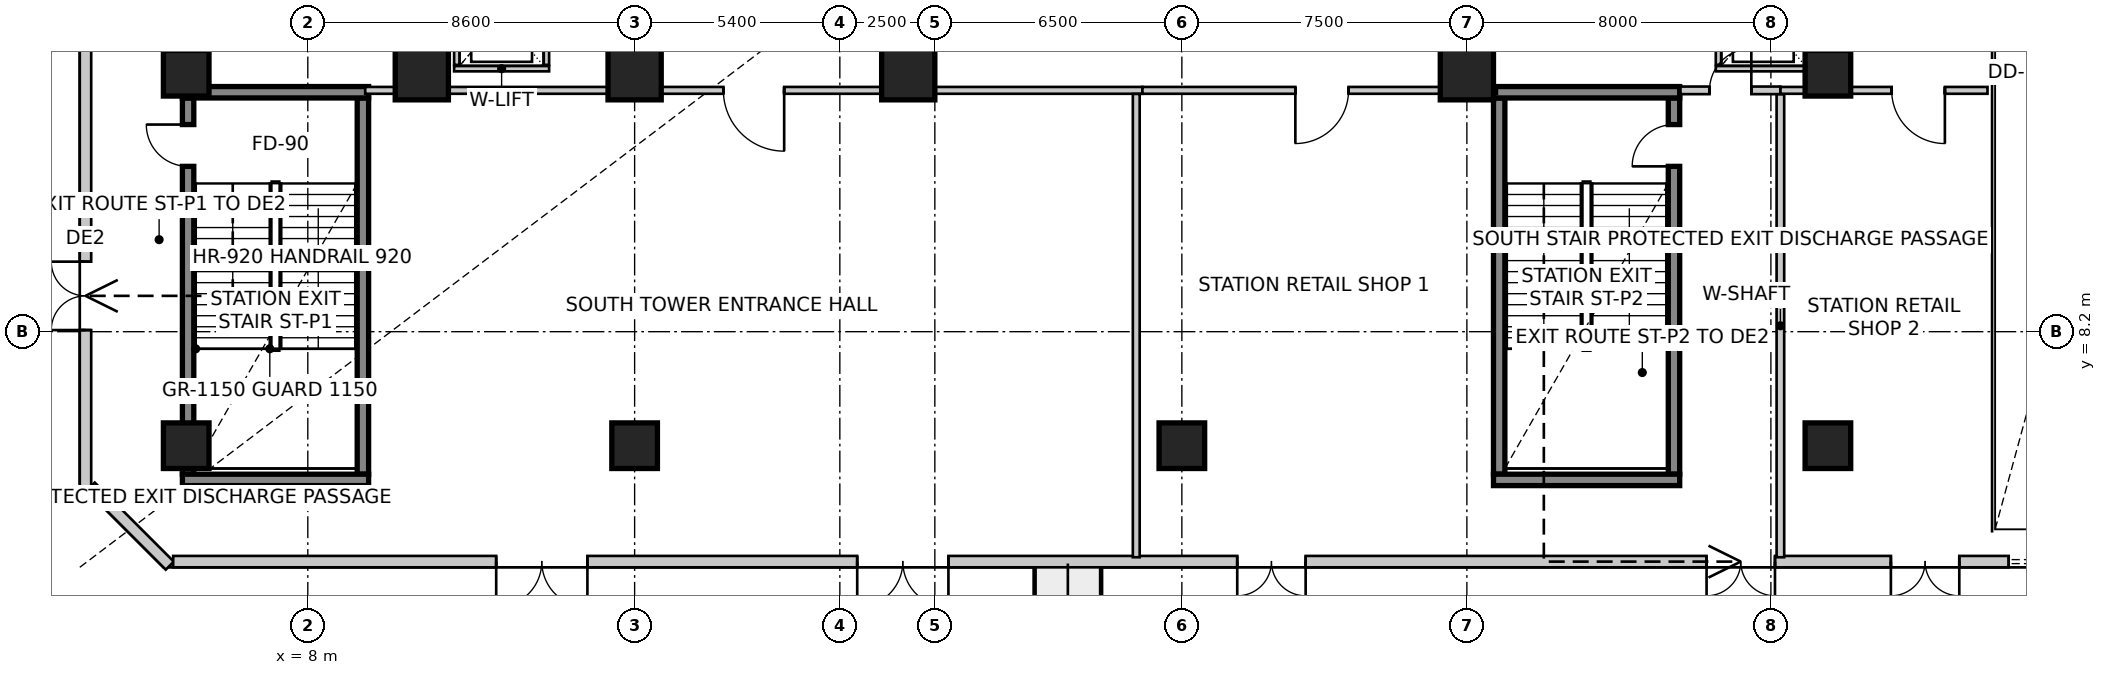
"""IFC4 building model, lengths in metres.
Left out: names, types, materials, properties, quantities, classifications, styles, units other than length and angle.
Written with IfcOpenShell. Run it as: python <this file> out.ifc"""

import sys

from ifc_helpers import new_model, si_unit, direction, frame, frame_2d, origin, origin_2d, place, context, subcontext, project, spatial, rectangle, extrude, source, transform, mapped, element, fill, save


model = new_model("IFC4")
c1 = context("Model", 3, precision=1e-05, world=origin(), true_north=direction((0.0, 1.0)))
c2 = subcontext(c1, "Body", "Model", "MODEL_VIEW")
j1 = project(units=[si_unit("LENGTHUNIT", "METRE"), si_unit("PLANEANGLEUNIT", "RADIAN")], contexts=[c1])
p1 = place(None, origin())
s1 = spatial("IfcSite", under=j1, at=p1, CompositionType="ELEMENT")
p2 = place(p1, origin())
s2 = spatial("IfcBuilding", under=s1, at=p2, CompositionType="ELEMENT")
p3 = place(p2, origin())
s3 = spatial("IfcBuildingStorey", under=s2, at=p3, CompositionType="ELEMENT", Elevation=0.0)
p4 = place(p3, frame((4.85, 4.45, 0.0), z_axis=(0.0, 0.0, 1.0), x_axis=(0.0, 1.0, 0.0)))
e1 = element("IfcWall", 1, at=p4, inside=s3, PredefinedType="SHEAR", context=c2, shape_type="SweptSolid", body=[
    extrude(rectangle(XDim=9.9, YDim=0.3, at=frame_2d((4.95, 0.0))), origin(), (0.0, 0.0, 1.0), 6.0),
])
m1 = source(origin(), c2, "Body", "SweptSolid", [
    extrude(rectangle(XDim=1.1, YDim=2.15, at=frame_2d((0.55, 1.075))), frame((0.0, 0.16, 0.0), z_axis=(0.0, -1.0, 0.0), x_axis=(1.0, 0.0, 0.0)), (0.0, 0.0, 1.0), 0.32),
])
p5 = place(p4, frame((8.1, 0.0, 0.0)))
e2 = element("IfcOpeningElement", 2, at=p5, cuts=e1, PredefinedType="OPENING", context=c2, shape_type="MappedRepresentation", body=[
    mapped(m1, transform((0.0, 0.0, 0.0), scale=1.0)),
])
p6 = place(p3, frame((9.45, 4.45, 0.0), z_axis=(0.0, 0.0, 1.0), x_axis=(0.0, 1.0, 0.0)))
e3 = element("IfcWall", 3, at=p6, inside=s3, PredefinedType="SHEAR", context=c2, shape_type="SweptSolid", body=[
    extrude(rectangle(XDim=9.9, YDim=0.3, at=frame_2d((4.95, 0.0))), origin(), (0.0, 0.0, 1.0), 6.0),
])
for number, where, z_axis, x_axis in (
    (4, (4.7, 4.3, 0.0), (0.0, 0.0, 1.0), (1.0, 0.0, 0.0)),
    (5, (4.7, 14.5, 0.0), (0.0, 0.0, 1.0), (1.0, 0.0, 0.0)),
):
    element("IfcWall", number, at=place(p3, frame(where, z_axis=z_axis, x_axis=x_axis)), inside=s3, PredefinedType="SHEAR", context=c2, shape_type="SweptSolid", body=[
        extrude(rectangle(XDim=4.9, YDim=0.3, at=frame_2d((2.45, 0.0))), origin(), (0.0, 0.0, 1.0), 6.0),
    ])
p7 = place(p3, frame((39.35, 4.45, 0.0), z_axis=(0.0, 0.0, 1.0), x_axis=(0.0, 1.0, 0.0)))
e6 = element("IfcWall", 6, at=p7, inside=s3, PredefinedType="SHEAR", context=c2, shape_type="SweptSolid", body=[
    extrude(rectangle(XDim=9.9, YDim=0.3, at=frame_2d((4.95, 0.0))), origin(), (0.0, 0.0, 1.0), 6.0),
])
p8 = place(p3, frame((43.95, 4.45, 0.0), z_axis=(0.0, 0.0, 1.0), x_axis=(0.0, 1.0, 0.0)))
e7 = element("IfcWall", 7, at=p8, inside=s3, PredefinedType="SHEAR", context=c2, shape_type="SweptSolid", body=[
    extrude(rectangle(XDim=9.9, YDim=0.3, at=frame_2d((4.95, 0.0))), origin(), (0.0, 0.0, 1.0), 6.0),
])
p9 = place(p8, frame((8.1, 0.0, 0.0)))
e8 = element("IfcOpeningElement", 8, at=p9, cuts=e7, PredefinedType="OPENING", context=c2, shape_type="MappedRepresentation", body=[
    mapped(m1, transform((0.0, 0.0, 0.0), scale=1.0)),
])
for number, where, z_axis, x_axis in (
    (9, (39.2, 4.3, 0.0), (0.0, 0.0, 1.0), (1.0, 0.0, 0.0)),
    (10, (39.2, 14.5, 0.0), (0.0, 0.0, 1.0), (1.0, 0.0, 0.0)),
):
    element("IfcWall", number, at=place(p3, frame(where, z_axis=z_axis, x_axis=x_axis)), inside=s3, PredefinedType="SHEAR", context=c2, shape_type="SweptSolid", body=[
        extrude(rectangle(XDim=4.9, YDim=0.3, at=frame_2d((2.45, 0.0))), origin(), (0.0, 0.0, 1.0), 6.0),
    ])
m2 = source(origin(), c2, "Body", "SweptSolid", [
    extrude(rectangle(XDim=1.2, YDim=1.2, at=origin_2d()), origin(), (0.0, 0.0, 1.0), 6.0),
])
for number, where, z_axis, x_axis in (
    (11, (4.8, 5.2, 0.0), (0.0, 0.0, 1.0), (1.0, 0.0, 0.0)),
    (12, (16.6, 5.2, 0.0), (0.0, 0.0, 1.0), (1.0, 0.0, 0.0)),
    (13, (31.0, 5.2, 0.0), (0.0, 0.0, 1.0), (1.0, 0.0, 0.0)),
    (14, (48.0, 5.2, 0.0), (0.0, 0.0, 1.0), (1.0, 0.0, 0.0)),
    (15, (4.8, 15.0, 0.0), (0.0, 0.0, 1.0), (1.0, 0.0, 0.0)),
):
    element("IfcColumn", number, at=place(p3, frame(where, z_axis=z_axis, x_axis=x_axis)), inside=s3, PredefinedType="COLUMN", context=c2, shape_type="MappedRepresentation", body=[
        mapped(m2, transform((0.0, 0.0, 0.0), scale=1.0)),
    ])
m3 = source(origin(), c2, "Body", "SweptSolid", [
    extrude(rectangle(XDim=1.4, YDim=1.4, at=origin_2d()), origin(), (0.0, 0.0, 1.0), 6.0),
])
for number, where, z_axis, x_axis in (
    (16, (11.0, 15.0, 0.0), (0.0, 0.0, 1.0), (1.0, 0.0, 0.0)),
    (17, (16.6, 15.0, 0.0), (0.0, 0.0, 1.0), (1.0, 0.0, 0.0)),
    (18, (23.8, 15.0, 0.0), (0.0, 0.0, 1.0), (1.0, 0.0, 0.0)),
    (19, (38.5, 15.0, 0.0), (0.0, 0.0, 1.0), (1.0, 0.0, 0.0)),
):
    element("IfcColumn", number, at=place(p3, frame(where, z_axis=z_axis, x_axis=x_axis)), inside=s3, PredefinedType="COLUMN", context=c2, shape_type="MappedRepresentation", body=[
        mapped(m3, transform((0.0, 0.0, 0.0), scale=1.0)),
    ])
p10 = place(p3, frame((48.0, 15.0, 0.0), z_axis=(0.0, 0.0, 1.0), x_axis=(1.0, 0.0, 0.0)))
e20 = element("IfcColumn", 20, at=p10, inside=s3, PredefinedType="COLUMN", context=c2, shape_type="MappedRepresentation", body=[
    mapped(m2, transform((0.0, 0.0, 0.0), scale=1.0)),
])
p11 = place(p3, frame((2.15, 4.112, 0.0), z_axis=(0.0, 0.0, 1.0), x_axis=(0.0, 1.0, 0.0)))
e21 = element("IfcWall", 21, at=p11, inside=s3, PredefinedType="SOLIDWALL", context=c2, shape_type="SweptSolid", body=[
    extrude(rectangle(XDim=45.431, YDim=0.3, at=frame_2d((22.715, 0.0))), origin(), (0.0, 0.0, 1.0), 5.7),
])
m4 = source(origin(), c2, "Body", "SweptSolid", [
    extrude(rectangle(XDim=2.4, YDim=2.8, at=frame_2d((1.2, 1.4))), frame((0.0, 0.16, 0.0), z_axis=(0.0, -1.0, 0.0), x_axis=(1.0, 0.0, 0.0)), (0.0, 0.0, 1.0), 0.32),
])
p12 = place(p11, frame((19.231, 0.0, 0.0)))
e22 = element("IfcOpeningElement", 22, at=p12, cuts=e21, PredefinedType="OPENING", context=c2, shape_type="MappedRepresentation", body=[
    mapped(m4, transform((0.0, 0.0, 0.0), scale=1.0)),
])
p13 = place(p11, frame((12.831, 0.0, 0.0)))
e23 = element("IfcOpeningElement", 23, at=p13, cuts=e21, PredefinedType="OPENING", context=c2, shape_type="MappedRepresentation", body=[
    mapped(m4, transform((0.0, 0.0, 0.0), scale=1.0)),
])
m5 = source(origin(), c2, "Body", "SweptSolid", [
    extrude(rectangle(XDim=1.8, YDim=2.4, at=frame_2d((0.9, 1.2))), frame((0.0, 0.16, 0.0), z_axis=(0.0, -1.0, 0.0), x_axis=(1.0, 0.0, 0.0)), (0.0, 0.0, 1.0), 0.32),
])
p14 = place(p11, frame((4.131, 0.0, 0.0)))
e24 = element("IfcOpeningElement", 24, at=p14, cuts=e21, PredefinedType="OPENING", context=c2, shape_type="MappedRepresentation", body=[
    mapped(m5, transform((0.0, 0.0, 0.0), scale=1.0)),
])
p15 = place(p3, frame((4.368, 2.044, 0.0), z_axis=(0.0, 0.0, 1.0), x_axis=(-0.707106781187, 0.707106781187, 0.0)))
e25 = element("IfcWall", 25, at=p15, inside=s3, PredefinedType="SOLIDWALL", context=c2, shape_type="SweptSolid", body=[
    extrude(rectangle(XDim=2.942, YDim=0.3, at=frame_2d((1.471, 0.0))), origin(), (0.0, 0.0, 1.0), 5.7),
])
p16 = place(p3, frame((65.543, 2.15, 0.0), z_axis=(0.0, 0.0, 1.0), x_axis=(-1.0, 0.0, 0.0)))
e26 = element("IfcWall", 26, at=p16, inside=s3, PredefinedType="SOLIDWALL", context=c2, shape_type="SweptSolid", body=[
    extrude(rectangle(XDim=61.085, YDim=0.3, at=frame_2d((30.543, 0.0))), origin(), (0.0, 0.0, 1.0), 5.7),
])
p17 = place(p16, frame((50.185, 0.0, 0.0)))
e27 = element("IfcOpeningElement", 27, at=p17, cuts=e26, PredefinedType="OPENING", context=c2, shape_type="MappedRepresentation", body=[
    mapped(m4, transform((0.0, 0.0, 0.0), scale=1.0)),
])
p18 = place(p16, frame((40.685, 0.0, 0.0)))
e28 = element("IfcOpeningElement", 28, at=p18, cuts=e26, PredefinedType="OPENING", context=c2, shape_type="MappedRepresentation", body=[
    mapped(m4, transform((0.0, 0.0, 0.0), scale=1.0)),
])
p19 = place(p16, frame((31.285, 0.0, 0.0)))
e29 = element("IfcOpeningElement", 29, at=p19, cuts=e26, PredefinedType="OPENING", context=c2, shape_type="MappedRepresentation", body=[
    mapped(m5, transform((0.0, 0.0, 0.0), scale=1.0)),
])
p20 = place(p16, frame((18.935, 0.0, 0.0)))
e30 = element("IfcOpeningElement", 30, at=p20, cuts=e26, PredefinedType="OPENING", context=c2, shape_type="MappedRepresentation", body=[
    mapped(m5, transform((0.0, 0.0, 0.0), scale=1.0)),
])
p21 = place(p16, frame((14.085, 0.0, 0.0)))
e31 = element("IfcOpeningElement", 31, at=p21, cuts=e26, PredefinedType="OPENING", context=c2, shape_type="MappedRepresentation", body=[
    mapped(m5, transform((0.0, 0.0, 0.0), scale=1.0)),
])
m6 = source(origin(), c2, "Body", "SweptSolid", [
    extrude(rectangle(XDim=5.8, YDim=3.8, at=frame_2d((2.9, 1.9))), frame((0.0, 0.16, 0.0), z_axis=(0.0, -1.0, 0.0), x_axis=(1.0, 0.0, 0.0)), (0.0, 0.0, 1.0), 0.32),
])
p22 = place(p16, frame((6.985, 0.0, 0.0)))
e32 = element("IfcOpeningElement", 32, at=p22, cuts=e26, PredefinedType="OPENING", context=c2, shape_type="MappedRepresentation", body=[
    mapped(m6, transform((0.0, 0.0, 0.0), scale=1.0)),
])
p23 = place(p3, frame((11.85, 15.12, 0.0), z_axis=(0.0, 0.0, 1.0), x_axis=(1.0, 0.0, 0.0)))
e33 = element("IfcWall", 33, at=p23, inside=s3, PredefinedType="SOLIDWALL", context=c2, shape_type="SweptSolid", body=[
    extrude(rectangle(XDim=2.5, YDim=0.14, at=frame_2d((1.25, 0.0))), origin(), (0.0, 0.0, 1.0), 4.492),
])
for number, where, z_axis, x_axis in (
    (34, (11.92, 15.22, 0.0), (0.0, 0.0, 1.0), (0.0, 1.0, 0.0)),
    (35, (14.28, 15.22, 0.0), (0.0, 0.0, 1.0), (0.0, 1.0, 0.0)),
):
    element("IfcWall", number, at=place(p3, frame(where, z_axis=z_axis, x_axis=x_axis)), inside=s3, PredefinedType="SOLIDWALL", context=c2, shape_type="SweptSolid", body=[
        extrude(rectangle(XDim=2.56, YDim=0.14, at=frame_2d((1.28, 0.0))), origin(), (0.0, 0.0, 1.0), 4.492),
    ])
p24 = place(p3, frame((45.05, 15.12, 0.0), z_axis=(0.0, 0.0, 1.0), x_axis=(1.0, 0.0, 0.0)))
e36 = element("IfcWall", 36, at=p24, inside=s3, PredefinedType="SOLIDWALL", context=c2, shape_type="SweptSolid", body=[
    extrude(rectangle(XDim=2.5, YDim=0.14, at=frame_2d((1.25, 0.0))), origin(), (0.0, 0.0, 1.0), 4.492),
])
p25 = place(p3, frame((45.12, 15.22, 0.0), z_axis=(0.0, 0.0, 1.0), x_axis=(0.0, 1.0, 0.0)))
e37 = element("IfcWall", 37, at=p25, inside=s3, PredefinedType="SOLIDWALL", context=c2, shape_type="SweptSolid", body=[
    extrude(rectangle(XDim=2.56, YDim=0.14, at=frame_2d((1.28, 0.0))), origin(), (0.0, 0.0, 1.0), 4.492),
])
p26 = place(p3, frame((47.48, 15.22, 0.0), z_axis=(0.0, 0.0, 1.0), x_axis=(0.0, 1.0, 0.0)))
e38 = element("IfcWall", 38, at=p26, inside=s3, PredefinedType="SOLIDWALL", context=c2, shape_type="SweptSolid", body=[
    extrude(rectangle(XDim=2.56, YDim=0.14, at=frame_2d((1.28, 0.0))), origin(), (0.0, 0.0, 1.0), 3.892),
])
p27 = place(p3, frame((44.12, 14.55, 0.0), z_axis=(0.0, 0.0, 1.0), x_axis=(1.0, 0.0, 0.0)))
e39 = element("IfcWall", 39, at=p27, inside=s3, PredefinedType="SOLIDWALL", context=c2, shape_type="SweptSolid", body=[
    extrude(rectangle(XDim=2.63, YDim=0.2, at=frame_2d((1.315, 0.0))), origin(), (0.0, 0.0, 1.0), 5.7),
])
m7 = source(origin(), c2, "Body", "SweptSolid", [
    extrude(rectangle(XDim=1.1, YDim=2.15, at=frame_2d((0.55, 1.075))), frame((0.0, 0.11, 0.0), z_axis=(0.0, -1.0, 0.0), x_axis=(1.0, 0.0, 0.0)), (0.0, 0.0, 1.0), 0.22),
])
p28 = place(p27, frame((0.765, 0.0, 0.0)))
e40 = element("IfcOpeningElement", 40, at=p28, cuts=e39, PredefinedType="OPENING", context=c2, shape_type="MappedRepresentation", body=[
    mapped(m7, transform((0.0, 0.0, 0.0), scale=1.0)),
])
p29 = place(p3, frame((46.75, 14.446, 0.0), z_axis=(0.0, 0.0, 1.0), x_axis=(0.0, -1.0, 0.0)))
e41 = element("IfcWall", 41, at=p29, inside=s3, PredefinedType="SOLIDWALL", context=c2, shape_type="SweptSolid", body=[
    extrude(rectangle(XDim=12.181, YDim=0.2, at=frame_2d((6.091, 0.0))), origin(), (0.0, 0.0, 1.0), 5.7),
])
p30 = place(p3, frame((29.96, 14.55, 0.0), z_axis=(0.0, 0.0, 1.0), x_axis=(-1.0, 0.0, 0.0)))
e42 = element("IfcWall", 42, at=p30, inside=s3, PredefinedType="PARTITIONING", context=c2, shape_type="SweptSolid", body=[
    extrude(rectangle(XDim=20.45, YDim=0.18, at=frame_2d((10.225, 0.0))), origin(), (0.0, 0.0, 1.0), 4.742),
])
m8 = source(origin(), c2, "Body", "SweptSolid", [
    extrude(rectangle(XDim=1.6, YDim=2.15, at=frame_2d((0.8, 1.075))), frame((0.0, 0.1, 0.0), z_axis=(0.0, -1.0, 0.0), x_axis=(1.0, 0.0, 0.0)), (0.0, 0.0, 1.0), 0.2),
])
p31 = place(p30, frame((9.425, 0.0, 0.0)))
e43 = element("IfcOpeningElement", 43, at=p31, cuts=e42, PredefinedType="OPENING", context=c2, shape_type="MappedRepresentation", body=[
    mapped(m8, transform((0.0, 0.0, 0.0), scale=1.0)),
])
p32 = place(p3, frame((39.29, 14.55, 0.0), z_axis=(0.0, 0.0, 1.0), x_axis=(-1.0, 0.0, 0.0)))
e44 = element("IfcWall", 44, at=p32, inside=s3, PredefinedType="PARTITIONING", context=c2, shape_type="SweptSolid", body=[
    extrude(rectangle(XDim=9.328, YDim=0.18, at=frame_2d((4.664, 0.0))), origin(), (0.0, 0.0, 1.0), 5.285),
])
m9 = source(origin(), c2, "Body", "SweptSolid", [
    extrude(rectangle(XDim=1.4, YDim=2.15, at=frame_2d((0.7, 1.075))), frame((0.0, 0.1, 0.0), z_axis=(0.0, -1.0, 0.0), x_axis=(1.0, 0.0, 0.0)), (0.0, 0.0, 1.0), 0.2),
])
p33 = place(p32, frame((3.904, 0.0, 0.0)))
e45 = element("IfcOpeningElement", 45, at=p33, cuts=e44, PredefinedType="OPENING", context=c2, shape_type="MappedRepresentation", body=[
    mapped(m9, transform((0.0, 0.0, 0.0), scale=1.0)),
])
p34 = place(p3, frame((52.2, 14.55, 0.0), z_axis=(0.0, 0.0, 1.0), x_axis=(-1.0, 0.0, 0.0)))
e46 = element("IfcWall", 46, at=p34, inside=s3, PredefinedType="PARTITIONING", context=c2, shape_type="SweptSolid", body=[
    extrude(rectangle(XDim=5.448, YDim=0.18, at=frame_2d((2.724, 0.0))), origin(), (0.0, 0.0, 1.0), 4.742),
])
p35 = place(p34, frame((1.122, 0.0, 0.0)))
e47 = element("IfcOpeningElement", 47, at=p35, cuts=e46, PredefinedType="OPENING", context=c2, shape_type="MappedRepresentation", body=[
    mapped(m9, transform((0.0, 0.0, 0.0), scale=1.0)),
])
p36 = place(p3, frame((29.8, 14.456, 0.0), z_axis=(0.0, 0.0, 1.0), x_axis=(0.0, -1.0, 0.0)))
e48 = element("IfcWall", 48, at=p36, inside=s3, PredefinedType="PARTITIONING", context=c2, shape_type="SweptSolid", body=[
    extrude(rectangle(XDim=12.191, YDim=0.18, at=frame_2d((6.096, 0.0))), origin(), (0.0, 0.0, 1.0), 4.492),
])
m10 = source(origin(), c2, "Body", "SweptSolid", [
    extrude(rectangle(XDim=1.8, YDim=2.4, at=frame_2d((0.9, 1.2))), frame((0.0, 0.025, 0.0), z_axis=(0.0, -1.0, 0.0), x_axis=(1.0, 0.0, 0.0)), (0.0, 0.0, 1.0), 0.05),
])
p37 = place(p14, origin())
e49 = element("IfcDoor", 49, at=p37, inside=s3, OperationType="DOUBLE_DOOR_SINGLE_SWING", PredefinedType="DOOR", context=c2, shape_type="MappedRepresentation", body=[
    mapped(m10, transform((0.0, 0.0, 0.0), scale=1.0)),
])
fill(e24, e49)
m11 = source(origin(), c2, "Body", "SweptSolid", [
    extrude(rectangle(XDim=2.4, YDim=2.8, at=frame_2d((1.2, 1.4))), frame((0.0, 0.025, 0.0), z_axis=(0.0, -1.0, 0.0), x_axis=(1.0, 0.0, 0.0)), (0.0, 0.0, 1.0), 0.05),
])
p38 = place(p17, origin())
e50 = element("IfcDoor", 50, at=p38, inside=s3, OperationType="DOUBLE_DOOR_SINGLE_SWING", PredefinedType="DOOR", context=c2, shape_type="MappedRepresentation", body=[
    mapped(m11, transform((0.0, 0.0, 0.0), scale=1.0)),
])
fill(e27, e50)
p39 = place(p18, origin())
e51 = element("IfcDoor", 51, at=p39, inside=s3, OperationType="DOUBLE_DOOR_SINGLE_SWING", PredefinedType="DOOR", context=c2, shape_type="MappedRepresentation", body=[
    mapped(m11, transform((0.0, 0.0, 0.0), scale=1.0)),
])
fill(e28, e51)
p40 = place(p19, origin())
e52 = element("IfcDoor", 52, at=p40, inside=s3, OperationType="DOUBLE_DOOR_SINGLE_SWING", PredefinedType="DOOR", context=c2, shape_type="MappedRepresentation", body=[
    mapped(m10, transform((0.0, 0.0, 0.0), scale=1.0)),
])
fill(e29, e52)
p41 = place(p20, origin())
e53 = element("IfcDoor", 53, at=p41, inside=s3, OperationType="DOUBLE_DOOR_SINGLE_SWING", PredefinedType="DOOR", context=c2, shape_type="MappedRepresentation", body=[
    mapped(m10, transform((0.0, 0.0, 0.0), scale=1.0)),
])
fill(e30, e53)
p42 = place(p21, origin())
e54 = element("IfcDoor", 54, at=p42, inside=s3, OperationType="DOUBLE_DOOR_SINGLE_SWING", PredefinedType="DOOR", context=c2, shape_type="MappedRepresentation", body=[
    mapped(m10, transform((0.0, 0.0, 0.0), scale=1.0)),
])
fill(e31, e54)
m12 = source(origin(), c2, "Body", "SweptSolid", [
    extrude(rectangle(XDim=5.8, YDim=3.8, at=frame_2d((2.9, 1.9))), frame((0.0, 0.025, 0.0), z_axis=(0.0, -1.0, 0.0), x_axis=(1.0, 0.0, 0.0)), (0.0, 0.0, 1.0), 0.05),
])
p43 = place(p22, origin())
e55 = element("IfcDoor", 55, at=p43, inside=s3, OperationType="ROLLINGUP", PredefinedType="GATE", context=c2, shape_type="MappedRepresentation", body=[
    mapped(m12, transform((0.0, 0.0, 0.0), scale=1.0)),
])
fill(e32, e55)
m13 = source(origin(), c2, "Body", "SweptSolid", [
    extrude(rectangle(XDim=1.1, YDim=2.15, at=frame_2d((0.55, 1.075))), frame((0.0, 0.025, 0.0), z_axis=(0.0, -1.0, 0.0), x_axis=(1.0, 0.0, 0.0)), (0.0, 0.0, 1.0), 0.05),
])
p44 = place(p5, origin())
e56 = element("IfcDoor", 56, at=p44, inside=s3, OperationType="SINGLE_SWING_RIGHT", PredefinedType="DOOR", context=c2, shape_type="MappedRepresentation", body=[
    mapped(m13, transform((0.0, 0.0, 0.0), scale=1.0)),
])
fill(e2, e56)
p45 = place(p9, origin())
e57 = element("IfcDoor", 57, at=p45, inside=s3, OperationType="SINGLE_SWING_LEFT", PredefinedType="DOOR", context=c2, shape_type="MappedRepresentation", body=[
    mapped(m13, transform((0.0, 0.0, 0.0), scale=1.0)),
])
fill(e8, e57)
m14 = source(origin(), c2, "Body", "SweptSolid", [
    extrude(rectangle(XDim=1.6, YDim=2.15, at=frame_2d((0.8, 1.075))), frame((0.0, 0.025, 0.0), z_axis=(0.0, -1.0, 0.0), x_axis=(1.0, 0.0, 0.0)), (0.0, 0.0, 1.0), 0.05),
])
p46 = place(p31, origin())
e58 = element("IfcDoor", 58, at=p46, inside=s3, OperationType="SINGLE_SWING_LEFT", PredefinedType="DOOR", context=c2, shape_type="MappedRepresentation", body=[
    mapped(m14, transform((0.0, 0.0, 0.0), scale=1.0)),
])
fill(e43, e58)
m15 = source(origin(), c2, "Body", "SweptSolid", [
    extrude(rectangle(XDim=1.4, YDim=2.15, at=frame_2d((0.7, 1.075))), frame((0.0, 0.025, 0.0), z_axis=(0.0, -1.0, 0.0), x_axis=(1.0, 0.0, 0.0)), (0.0, 0.0, 1.0), 0.05),
])
p47 = place(p33, origin())
e59 = element("IfcDoor", 59, at=p47, inside=s3, OperationType="SINGLE_SWING_RIGHT", PredefinedType="DOOR", context=c2, shape_type="MappedRepresentation", body=[
    mapped(m15, transform((0.0, 0.0, 0.0), scale=1.0)),
])
fill(e45, e59)
p48 = place(p35, origin())
e60 = element("IfcDoor", 60, at=p48, inside=s3, OperationType="SINGLE_SWING_LEFT", PredefinedType="DOOR", context=c2, shape_type="MappedRepresentation", body=[
    mapped(m15, transform((0.0, 0.0, 0.0), scale=1.0)),
])
fill(e47, e60)
p49 = place(p28, origin())
e61 = element("IfcDoor", 61, at=p49, inside=s3, OperationType="SINGLE_SWING_RIGHT", PredefinedType="DOOR", context=c2, shape_type="MappedRepresentation", body=[
    mapped(m13, transform((0.0, 0.0, 0.0), scale=1.0)),
])
fill(e40, e61)
save(model, sys.argv[1])
